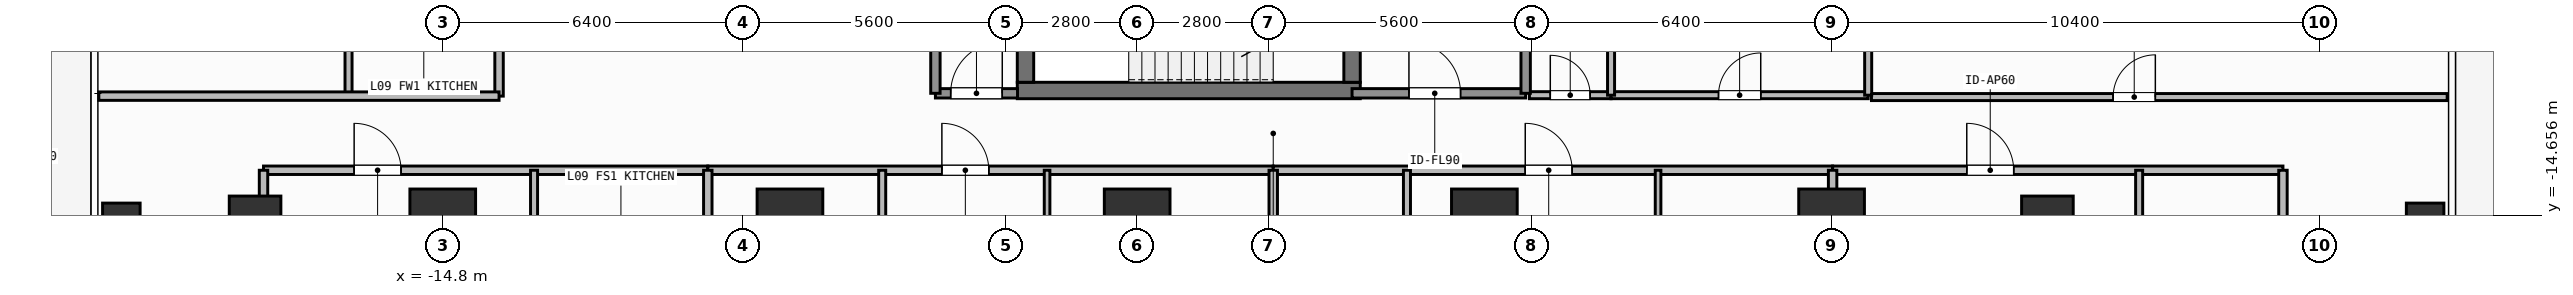
"""IFC4 building model, lengths in metres.
Left out: names, types, materials, properties, quantities, classifications, styles, units other than length and angle.
Written with IfcOpenShell. Run it as: python <this file> out.ifc"""

import sys

from ifc_helpers import new_model, si_unit, direction, frame, frame_2d, origin, origin_2d, place, context, subcontext, project, spatial, rectangle, hollow_rectangle, extrude, element, fill, save


model = new_model("IFC4")
c1 = context("Model", 3, precision=1e-05, world=origin(), true_north=direction((0.0, 1.0)))
c2 = subcontext(c1, "Body", "Model", "MODEL_VIEW")
j1 = project(units=[si_unit("LENGTHUNIT", "METRE"), si_unit("PLANEANGLEUNIT", "RADIAN")], contexts=[c1])
p1 = place(None, origin())
s1 = spatial("IfcSite", under=j1, at=p1, CompositionType="ELEMENT")
p2 = place(p1, origin())
s2 = spatial("IfcBuilding", under=s1, at=p2, CompositionType="ELEMENT")
p3 = place(p2, frame((0.0, 0.0, 34.5)))
s3 = spatial("IfcBuildingStorey", under=s2, at=p3, CompositionType="ELEMENT", Elevation=34.5)
p4 = place(p3, frame((-2.555, -12.0, 0.0), z_axis=(0.0, 0.0, 1.0), x_axis=(1.0, 0.0, 0.0)))
e1 = element("IfcWall", 1, at=p4, inside=s3, PredefinedType="SHEAR", context=c2, shape_type="SweptSolid", body=[
    extrude(rectangle(XDim=7.31, YDim=0.35, at=frame_2d((3.655, 0.0))), origin(), (0.0, 0.0, 1.0), 3.9),
])
p5 = place(p3, frame((-2.38, -11.825, 0.0), z_axis=(0.0, 0.0, 1.0), x_axis=(0.0, 1.0, 0.0)))
e2 = element("IfcWall", 2, at=p5, inside=s3, PredefinedType="SHEAR", context=c2, shape_type="SweptSolid", body=[
    extrude(rectangle(XDim=2.925, YDim=0.35, at=frame_2d((1.462, 0.0))), origin(), (0.0, 0.0, 1.0), 3.9),
])
p6 = place(p3, frame((4.58, -8.9, 0.0), z_axis=(0.0, 0.0, 1.0), x_axis=(0.0, -1.0, 0.0)))
e3 = element("IfcWall", 3, at=p6, inside=s3, PredefinedType="SHEAR", context=c2, shape_type="SweptSolid", body=[
    extrude(rectangle(XDim=2.925, YDim=0.35, at=frame_2d((1.462, 0.0))), origin(), (0.0, 0.0, 1.0), 3.9),
])
p7 = place(p6, frame((0.913, 0.0, 0.0)))
e4 = element("IfcOpeningElement", 4, at=p7, cuts=e3, PredefinedType="OPENING", context=c2, shape_type="SweptSolid", body=[
    extrude(rectangle(XDim=1.1, YDim=2.15, at=frame_2d((0.55, 1.075))), frame((0.0, 0.185, 0.0), z_axis=(0.0, -1.0, 0.0), x_axis=(1.0, 0.0, 0.0)), (0.0, 0.0, 1.0), 0.37),
])
for number, where, z_axis, x_axis in (
    (5, (-14.8, -14.8, 0.0), (0.0, 0.0, 1.0), (1.0, 0.0, 0.0)),
    (6, (-7.4, -14.8, 0.0), (0.0, 0.0, 1.0), (1.0, 0.0, 0.0)),
    (7, (0.0, -14.8, 0.0), (0.0, 0.0, 1.0), (1.0, 0.0, 0.0)),
    (8, (7.4, -14.8, 0.0), (0.0, 0.0, 1.0), (1.0, 0.0, 0.0)),
    (9, (14.8, -14.8, 0.0), (0.0, 0.0, 1.0), (1.0, 0.0, 0.0)),
):
    element("IfcColumn", number, at=place(p3, frame(where, z_axis=z_axis, x_axis=x_axis)), inside=s3, PredefinedType="COLUMN", context=c2, shape_type="SweptSolid", body=[
        extrude(rectangle(XDim=1.4, YDim=1.4, at=origin_2d()), origin(), (0.0, 0.0, 1.0), 3.9),
    ])
for number, where, z_axis, x_axis in (
    (10, (-18.8, -14.8, 0.0), (0.0, 0.0, 1.0), (1.0, 0.0, 0.0)),
    (11, (19.4, -14.8, 0.0), (0.0, 0.0, 1.0), (1.0, 0.0, 0.0)),
):
    element("IfcColumn", number, at=place(p3, frame(where, z_axis=z_axis, x_axis=x_axis)), inside=s3, PredefinedType="COLUMN", context=c2, shape_type="SweptSolid", body=[
        extrude(rectangle(XDim=1.1, YDim=1.1, at=origin_2d()), origin(), (0.0, 0.0, 1.0), 3.9),
    ])
for number, where, z_axis, x_axis in (
    (12, (-21.65, -14.8, 0.0), (0.0, 0.0, 1.0), (1.0, 0.0, 0.0)),
    (13, (27.45, -14.8, 0.0), (0.0, 0.0, 1.0), (1.0, 0.0, 0.0)),
):
    element("IfcColumn", number, at=place(p3, frame(where, z_axis=z_axis, x_axis=x_axis)), inside=s3, PredefinedType="COLUMN", context=c2, shape_type="SweptSolid", body=[
        extrude(hollow_rectangle(XDim=0.8, YDim=0.8, WallThickness=0.036, at=origin_2d()), origin(), (0.0, 0.0, 1.0), 3.9),
    ])
p8 = place(p3, frame((4.58, -12.06, 0.0), z_axis=(0.0, 0.0, 1.0), x_axis=(1.0, 0.0, 0.0)))
e14 = element("IfcWall", 14, at=p8, inside=s3, PredefinedType="SOLIDWALL", context=c2, shape_type="SweptSolid", body=[
    extrude(rectangle(XDim=3.7, YDim=0.2, at=frame_2d((1.85, 0.0))), origin(), (0.0, 0.0, 1.0), 3.68),
])
p9 = place(p8, frame((1.212, 0.0, 0.0)))
e15 = element("IfcOpeningElement", 15, at=p9, cuts=e14, PredefinedType="OPENING", context=c2, shape_type="SweptSolid", body=[
    extrude(rectangle(XDim=1.1, YDim=2.15, at=frame_2d((0.55, 1.075))), frame((0.0, 0.11, 0.0), z_axis=(0.0, -1.0, 0.0), x_axis=(1.0, 0.0, 0.0)), (0.0, 0.0, 1.0), 0.22),
])
p10 = place(p3, frame((-4.3, -12.06, 0.0), z_axis=(0.0, 0.0, 1.0), x_axis=(1.0, 0.0, 0.0)))
e16 = element("IfcWall", 16, at=p10, inside=s3, PredefinedType="SOLIDWALL", context=c2, shape_type="SweptSolid", body=[
    extrude(rectangle(XDim=1.75, YDim=0.2, at=frame_2d((0.875, 0.0))), origin(), (0.0, 0.0, 1.0), 3.68),
])
p11 = place(p10, frame((0.325, 0.0, 0.0)))
e17 = element("IfcOpeningElement", 17, at=p11, cuts=e16, PredefinedType="OPENING", context=c2, shape_type="SweptSolid", body=[
    extrude(rectangle(XDim=1.1, YDim=2.15, at=frame_2d((0.55, 1.075))), frame((0.0, 0.11, 0.0), z_axis=(0.0, -1.0, 0.0), x_axis=(1.0, 0.0, 0.0)), (0.0, 0.0, 1.0), 0.22),
])
p12 = place(p3, frame((8.36, -12.1, 0.0), z_axis=(0.0, 0.0, 1.0), x_axis=(1.0, 0.0, 0.0)))
e18 = element("IfcWall", 18, at=p12, inside=s3, PredefinedType="PARTITIONING", context=c2, shape_type="SweptSolid", body=[
    extrude(rectangle(XDim=1.74, YDim=0.15, at=frame_2d((0.87, 0.0))), origin(), (0.0, 0.0, 1.0), 3.68),
])
p13 = place(p12, frame((0.445, 0.0, 0.0)))
e19 = element("IfcOpeningElement", 19, at=p13, cuts=e18, PredefinedType="OPENING", context=c2, shape_type="SweptSolid", body=[
    extrude(rectangle(XDim=0.85, YDim=2.1, at=frame_2d((0.425, 1.05))), frame((0.0, 0.085, 0.0), z_axis=(0.0, -1.0, 0.0), x_axis=(1.0, 0.0, 0.0)), (0.0, 0.0, 1.0), 0.17),
])
p14 = place(p3, frame((10.1, -12.1, 0.0), z_axis=(0.0, 0.0, 1.0), x_axis=(1.0, 0.0, 0.0)))
e20 = element("IfcWall", 20, at=p14, inside=s3, PredefinedType="PARTITIONING", context=c2, shape_type="SweptSolid", body=[
    extrude(rectangle(XDim=5.48, YDim=0.15, at=frame_2d((2.74, 0.0))), origin(), (0.0, 0.0, 1.0), 3.68),
])
p15 = place(p14, frame((2.29, 0.0, 0.0)))
e21 = element("IfcOpeningElement", 21, at=p15, cuts=e20, PredefinedType="OPENING", context=c2, shape_type="SweptSolid", body=[
    extrude(rectangle(XDim=0.9, YDim=2.1, at=frame_2d((0.45, 1.05))), frame((0.0, 0.085, 0.0), z_axis=(0.0, -1.0, 0.0), x_axis=(1.0, 0.0, 0.0)), (0.0, 0.0, 1.0), 0.17),
])
p16 = place(p3, frame((-18.62, -13.7, 0.0), z_axis=(0.0, 0.0, 1.0), x_axis=(1.0, 0.0, 0.0)))
e22 = element("IfcWall", 22, at=p16, inside=s3, PredefinedType="PARTITIONING", context=c2, shape_type="SweptSolid", body=[
    extrude(rectangle(XDim=9.469, YDim=0.18, at=frame_2d((4.735, 0.0))), origin(), (0.0, 0.0, 1.0), 3.68),
])
p17 = place(p16, frame((1.931, 0.0, 0.0)))
e23 = element("IfcOpeningElement", 23, at=p17, cuts=e22, PredefinedType="OPENING", context=c2, shape_type="SweptSolid", body=[
    extrude(rectangle(XDim=1.0, YDim=2.2, at=frame_2d((0.5, 1.1))), frame((0.0, 0.1, 0.0), z_axis=(0.0, -1.0, 0.0), x_axis=(1.0, 0.0, 0.0)), (0.0, 0.0, 1.0), 0.2),
])
p18 = place(p3, frame((-12.854, -17.599, 0.0), z_axis=(0.0, 0.0, 1.0), x_axis=(0.0, 1.0, 0.0)))
e24 = element("IfcWall", 24, at=p18, inside=s3, PredefinedType="PARTITIONING", context=c2, shape_type="SweptSolid", body=[
    extrude(rectangle(XDim=3.899, YDim=0.15, at=frame_2d((1.95, 0.0))), origin(), (0.0, 0.0, 1.0), 3.68),
])
p19 = place(p18, frame((1.183, 0.0, 0.0)))
e25 = element("IfcOpeningElement", 25, at=p19, cuts=e24, PredefinedType="OPENING", context=c2, shape_type="SweptSolid", body=[
    extrude(rectangle(XDim=0.85, YDim=2.1, at=frame_2d((0.425, 1.05))), frame((0.0, 0.085, 0.0), z_axis=(0.0, -1.0, 0.0), x_axis=(1.0, 0.0, 0.0)), (0.0, 0.0, 1.0), 0.17),
])
p20 = place(p3, frame((-9.151, -13.7, 0.0), z_axis=(0.0, 0.0, 1.0), x_axis=(1.0, 0.0, 0.0)))
e26 = element("IfcWall", 26, at=p20, inside=s3, PredefinedType="PARTITIONING", context=c2, shape_type="SweptSolid", body=[
    extrude(rectangle(XDim=12.051, YDim=0.18, at=frame_2d((6.025, 0.0))), origin(), (0.0, 0.0, 1.0), 3.68),
])
p21 = place(p20, frame((4.989, 0.0, 0.0)))
e27 = element("IfcOpeningElement", 27, at=p21, cuts=e26, PredefinedType="OPENING", context=c2, shape_type="SweptSolid", body=[
    extrude(rectangle(XDim=1.0, YDim=2.2, at=frame_2d((0.5, 1.1))), frame((0.0, 0.1, 0.0), z_axis=(0.0, -1.0, 0.0), x_axis=(1.0, 0.0, 0.0)), (0.0, 0.0, 1.0), 0.2),
])
p22 = place(p3, frame((-5.434, -20.79, 0.0), z_axis=(0.0, 0.0, 1.0), x_axis=(0.0, 1.0, 0.0)))
e28 = element("IfcWall", 28, at=p22, inside=s3, PredefinedType="PARTITIONING", context=c2, shape_type="SweptSolid", body=[
    extrude(rectangle(XDim=7.09, YDim=0.15, at=frame_2d((3.545, 0.0))), origin(), (0.0, 0.0, 1.0), 3.68),
])
p23 = place(p22, frame((2.133, 0.0, 0.0)))
e29 = element("IfcOpeningElement", 29, at=p23, cuts=e28, PredefinedType="OPENING", context=c2, shape_type="SweptSolid", body=[
    extrude(rectangle(XDim=0.85, YDim=2.1, at=frame_2d((0.425, 1.05))), frame((0.0, 0.085, 0.0), z_axis=(0.0, -1.0, 0.0), x_axis=(1.0, 0.0, 0.0)), (0.0, 0.0, 1.0), 0.17),
])
p24 = place(p3, frame((-1.92, -18.663, 0.0), z_axis=(0.0, 0.0, 1.0), x_axis=(0.0, 1.0, 0.0)))
e30 = element("IfcWall", 30, at=p24, inside=s3, PredefinedType="PARTITIONING", context=c2, shape_type="SweptSolid", body=[
    extrude(rectangle(XDim=4.963, YDim=0.12, at=frame_2d((2.481, 0.0))), origin(), (0.0, 0.0, 1.0), 3.68),
])
p25 = place(p24, frame((2.056, 0.0, 0.0)))
e31 = element("IfcOpeningElement", 31, at=p25, cuts=e30, PredefinedType="OPENING", context=c2, shape_type="SweptSolid", body=[
    extrude(rectangle(XDim=0.85, YDim=2.1, at=frame_2d((0.425, 1.05))), frame((0.0, 0.07, 0.0), z_axis=(0.0, -1.0, 0.0), x_axis=(1.0, 0.0, 0.0)), (0.0, 0.0, 1.0), 0.14),
])
p26 = place(p3, frame((2.9, -13.7, 0.0), z_axis=(0.0, 0.0, 1.0), x_axis=(1.0, 0.0, 0.0)))
e32 = element("IfcWall", 32, at=p26, inside=s3, PredefinedType="PARTITIONING", context=c2, shape_type="SweptSolid", body=[
    extrude(rectangle(XDim=11.922, YDim=0.18, at=frame_2d((5.961, 0.0))), origin(), (0.0, 0.0, 1.0), 3.68),
])
p27 = place(p26, frame((5.371, 0.0, 0.0)))
e33 = element("IfcOpeningElement", 33, at=p27, cuts=e32, PredefinedType="OPENING", context=c2, shape_type="SweptSolid", body=[
    extrude(rectangle(XDim=1.0, YDim=2.2, at=frame_2d((0.5, 1.1))), frame((0.0, 0.1, 0.0), z_axis=(0.0, -1.0, 0.0), x_axis=(1.0, 0.0, 0.0)), (0.0, 0.0, 1.0), 0.2),
])
p28 = place(p3, frame((5.75, -20.79, 0.0), z_axis=(0.0, 0.0, 1.0), x_axis=(0.0, 1.0, 0.0)))
e34 = element("IfcWall", 34, at=p28, inside=s3, PredefinedType="PARTITIONING", context=c2, shape_type="SweptSolid", body=[
    extrude(rectangle(XDim=7.09, YDim=0.15, at=frame_2d((3.545, 0.0))), origin(), (0.0, 0.0, 1.0), 3.68),
])
p29 = place(p28, frame((2.133, 0.0, 0.0)))
e35 = element("IfcOpeningElement", 35, at=p29, cuts=e34, PredefinedType="OPENING", context=c2, shape_type="SweptSolid", body=[
    extrude(rectangle(XDim=0.85, YDim=2.1, at=frame_2d((0.425, 1.05))), frame((0.0, 0.085, 0.0), z_axis=(0.0, -1.0, 0.0), x_axis=(1.0, 0.0, 0.0)), (0.0, 0.0, 1.0), 0.17),
])
p30 = place(p3, frame((11.102, -18.535, 0.0), z_axis=(0.0, 0.0, 1.0), x_axis=(0.0, 1.0, 0.0)))
e36 = element("IfcWall", 36, at=p30, inside=s3, PredefinedType="PARTITIONING", context=c2, shape_type="SweptSolid", body=[
    extrude(rectangle(XDim=4.835, YDim=0.12, at=frame_2d((2.417, 0.0))), origin(), (0.0, 0.0, 1.0), 3.37),
])
p31 = place(p30, frame((1.905, 0.0, 0.0)))
e37 = element("IfcOpeningElement", 37, at=p31, cuts=e36, PredefinedType="OPENING", context=c2, shape_type="SweptSolid", body=[
    extrude(rectangle(XDim=0.85, YDim=2.1, at=frame_2d((0.425, 1.05))), frame((0.0, 0.07, 0.0), z_axis=(0.0, -1.0, 0.0), x_axis=(1.0, 0.0, 0.0)), (0.0, 0.0, 1.0), 0.14),
])
p32 = place(p3, frame((14.822, -13.7, 0.0), z_axis=(0.0, 0.0, 1.0), x_axis=(1.0, 0.0, 0.0)))
e38 = element("IfcWall", 38, at=p32, inside=s3, PredefinedType="PARTITIONING", context=c2, shape_type="SweptSolid", body=[
    extrude(rectangle(XDim=9.598, YDim=0.18, at=frame_2d((4.799, 0.0))), origin(), (0.0, 0.0, 1.0), 3.68),
])
p33 = place(p32, frame((2.859, 0.0, 0.0)))
e39 = element("IfcOpeningElement", 39, at=p33, cuts=e38, PredefinedType="OPENING", context=c2, shape_type="SweptSolid", body=[
    extrude(rectangle(XDim=1.0, YDim=2.2, at=frame_2d((0.5, 1.1))), frame((0.0, 0.1, 0.0), z_axis=(0.0, -1.0, 0.0), x_axis=(1.0, 0.0, 0.0)), (0.0, 0.0, 1.0), 0.2),
])
p34 = place(p3, frame((21.355, -17.599, 0.0), z_axis=(0.0, 0.0, 1.0), x_axis=(0.0, 1.0, 0.0)))
e40 = element("IfcWall", 40, at=p34, inside=s3, PredefinedType="PARTITIONING", context=c2, shape_type="SweptSolid", body=[
    extrude(rectangle(XDim=3.899, YDim=0.15, at=frame_2d((1.95, 0.0))), origin(), (0.0, 0.0, 1.0), 3.68),
])
p35 = place(p34, frame((1.354, 0.0, 0.0)))
e41 = element("IfcOpeningElement", 41, at=p35, cuts=e40, PredefinedType="OPENING", context=c2, shape_type="SweptSolid", body=[
    extrude(rectangle(XDim=0.85, YDim=2.1, at=frame_2d((0.425, 1.05))), frame((0.0, 0.085, 0.0), z_axis=(0.0, -1.0, 0.0), x_axis=(1.0, 0.0, 0.0)), (0.0, 0.0, 1.0), 0.17),
])
p36 = place(p3, frame((-13.6, -12.12, 0.0), z_axis=(0.0, 0.0, 1.0), x_axis=(0.0, 1.0, 0.0)))
e42 = element("IfcWall", 42, at=p36, inside=s3, PredefinedType="PARTITIONING", context=c2, shape_type="SweptSolid", body=[
    extrude(rectangle(XDim=12.847, YDim=0.18, at=frame_2d((6.424, 0.0))), origin(), (0.0, 0.0, 1.0), 3.68),
])
p37 = place(p36, frame((5.48, 0.0, 0.0)))
e43 = element("IfcOpeningElement", 43, at=p37, cuts=e42, PredefinedType="OPENING", context=c2, shape_type="SweptSolid", body=[
    extrude(rectangle(XDim=1.0, YDim=2.2, at=frame_2d((0.5, 1.1))), frame((0.0, 0.1, 0.0), z_axis=(0.0, -1.0, 0.0), x_axis=(1.0, 0.0, 0.0)), (0.0, 0.0, 1.0), 0.2),
])
p38 = place(p3, frame((15.65, -12.14, 0.0), z_axis=(0.0, 0.0, 1.0), x_axis=(1.0, 0.0, 0.0)))
e44 = element("IfcWall", 44, at=p38, inside=s3, PredefinedType="PARTITIONING", context=c2, shape_type="SweptSolid", body=[
    extrude(rectangle(XDim=12.27, YDim=0.15, at=frame_2d((6.135, 0.0))), origin(), (0.0, 0.0, 1.0), 3.68),
])
p39 = place(p38, frame((5.15, 0.0, 0.0)))
e45 = element("IfcOpeningElement", 45, at=p39, cuts=e44, PredefinedType="OPENING", context=c2, shape_type="SweptSolid", body=[
    extrude(rectangle(XDim=0.9, YDim=2.1, at=frame_2d((0.45, 1.05))), frame((0.0, 0.085, 0.0), z_axis=(0.0, -1.0, 0.0), x_axis=(1.0, 0.0, 0.0)), (0.0, 0.0, 1.0), 0.17),
])
for number, where, z_axis, x_axis in (
    (46, (8.28, -12.06, 0.0), (0.0, 0.0, 1.0), (0.0, 1.0, 0.0)),
    (47, (-4.3, -12.06, 0.0), (0.0, 0.0, 1.0), (0.0, 1.0, 0.0)),
):
    element("IfcWall", number, at=place(p3, frame(where, z_axis=z_axis, x_axis=x_axis)), inside=s3, PredefinedType="SOLIDWALL", context=c2, shape_type="SweptSolid", body=[
        extrude(rectangle(XDim=3.11, YDim=0.2, at=frame_2d((1.555, 0.0))), origin(), (0.0, 0.0, 1.0), 3.68),
    ])
p40 = place(p3, frame((10.1, -12.1, 0.0), z_axis=(0.0, 0.0, 1.0), x_axis=(0.0, 1.0, 0.0)))
e48 = element("IfcWall", 48, at=p40, inside=s3, PredefinedType="PARTITIONING", context=c2, shape_type="SweptSolid", body=[
    extrude(rectangle(XDim=2.35, YDim=0.15, at=frame_2d((1.175, 0.0))), origin(), (0.0, 0.0, 1.0), 3.68),
])
p41 = place(p3, frame((15.58, -12.1, 0.0), z_axis=(0.0, 0.0, 1.0), x_axis=(0.0, 1.0, 0.0)))
e49 = element("IfcWall", 49, at=p41, inside=s3, PredefinedType="PARTITIONING", context=c2, shape_type="SweptSolid", body=[
    extrude(rectangle(XDim=6.25, YDim=0.15, at=frame_2d((3.125, 0.0))), origin(), (0.0, 0.0, 1.0), 3.68),
])
p42 = place(p3, frame((-18.62, -23.91, 0.0), z_axis=(0.0, 0.0, 1.0), x_axis=(0.0, 1.0, 0.0)))
e50 = element("IfcWall", 50, at=p42, inside=s3, PredefinedType="PARTITIONING", context=c2, shape_type="SweptSolid", body=[
    extrude(rectangle(XDim=10.21, YDim=0.18, at=frame_2d((5.105, 0.0))), origin(), (0.0, 0.0, 1.0), 3.082),
])
p43 = place(p3, frame((24.42, -23.91, 0.0), z_axis=(0.0, 0.0, 1.0), x_axis=(0.0, 1.0, 0.0)))
e51 = element("IfcWall", 51, at=p43, inside=s3, PredefinedType="PARTITIONING", context=c2, shape_type="SweptSolid", body=[
    extrude(rectangle(XDim=10.21, YDim=0.18, at=frame_2d((5.105, 0.0))), origin(), (0.0, 0.0, 1.0), 3.68),
])
for number, where, z_axis, x_axis in (
    (52, (-9.151, -25.03, 0.0), (0.0, 0.0, 1.0), (0.0, 1.0, 0.0)),
    (53, (2.9, -25.03, 0.0), (0.0, 0.0, 1.0), (0.0, 1.0, 0.0)),
):
    element("IfcWall", number, at=place(p3, frame(where, z_axis=z_axis, x_axis=x_axis)), inside=s3, PredefinedType="PARTITIONING", context=c2, shape_type="SweptSolid", body=[
        extrude(rectangle(XDim=11.33, YDim=0.18, at=frame_2d((5.665, 0.0))), origin(), (0.0, 0.0, 1.0), 3.68),
    ])
p44 = place(p3, frame((14.822, -25.03, 0.0), z_axis=(0.0, 0.0, 1.0), x_axis=(0.0, 1.0, 0.0)))
e54 = element("IfcWall", 54, at=p44, inside=s3, PredefinedType="PARTITIONING", context=c2, shape_type="SweptSolid", body=[
    extrude(rectangle(XDim=11.33, YDim=0.18, at=frame_2d((5.665, 0.0))), origin(), (0.0, 0.0, 1.0), 3.082),
])
p45 = place(p3, frame((-16.808, -12.12, 0.0), z_axis=(0.0, 0.0, 1.0), x_axis=(0.0, 1.0, 0.0)))
e55 = element("IfcWall", 55, at=p45, inside=s3, PredefinedType="PARTITIONING", context=c2, shape_type="SweptSolid", body=[
    extrude(rectangle(XDim=2.8, YDim=0.15, at=frame_2d((1.4, 0.0))), origin(), (0.0, 0.0, 1.0), 3.68),
])
p46 = place(p3, frame((-22.13, -12.12, 0.0), z_axis=(0.0, 0.0, 1.0), x_axis=(1.0, 0.0, 0.0)))
e56 = element("IfcWall", 56, at=p46, inside=s3, PredefinedType="PARTITIONING", context=c2, shape_type="SweptSolid", body=[
    extrude(rectangle(XDim=8.53, YDim=0.18, at=frame_2d((4.265, 0.0))), origin(), (0.0, 0.0, 1.0), 3.68),
])
p47 = place(p9, origin())
e57 = element("IfcDoor", 57, at=p47, inside=s3, OperationType="SINGLE_SWING_LEFT", PredefinedType="DOOR", context=c2, shape_type="SweptSolid", body=[
    extrude(rectangle(XDim=1.1, YDim=2.15, at=frame_2d((0.55, 1.075))), frame((0.0, 0.025, 0.0), z_axis=(0.0, -1.0, 0.0), x_axis=(1.0, 0.0, 0.0)), (0.0, 0.0, 1.0), 0.05),
])
fill(e15, e57)
p48 = place(p11, origin())
e58 = element("IfcDoor", 58, at=p48, inside=s3, OperationType="SINGLE_SWING_RIGHT", PredefinedType="DOOR", context=c2, shape_type="SweptSolid", body=[
    extrude(rectangle(XDim=1.1, YDim=2.15, at=frame_2d((0.55, 1.075))), frame((0.0, 0.025, 0.0), z_axis=(0.0, -1.0, 0.0), x_axis=(1.0, 0.0, 0.0)), (0.0, 0.0, 1.0), 0.05),
])
fill(e17, e58)
p49 = place(p13, origin())
e59 = element("IfcDoor", 59, at=p49, inside=s3, OperationType="SINGLE_SWING_LEFT", PredefinedType="DOOR", context=c2, shape_type="SweptSolid", body=[
    extrude(rectangle(XDim=0.85, YDim=2.1, at=frame_2d((0.425, 1.05))), frame((0.0, 0.025, 0.0), z_axis=(0.0, -1.0, 0.0), x_axis=(1.0, 0.0, 0.0)), (0.0, 0.0, 1.0), 0.05),
])
fill(e19, e59)
p50 = place(p15, origin())
e60 = element("IfcDoor", 60, at=p50, inside=s3, OperationType="SINGLE_SWING_RIGHT", PredefinedType="DOOR", context=c2, shape_type="SweptSolid", body=[
    extrude(rectangle(XDim=0.9, YDim=2.1, at=frame_2d((0.45, 1.05))), frame((0.0, 0.025, 0.0), z_axis=(0.0, -1.0, 0.0), x_axis=(1.0, 0.0, 0.0)), (0.0, 0.0, 1.0), 0.05),
])
fill(e21, e60)
p51 = place(p17, origin())
e61 = element("IfcDoor", 61, at=p51, inside=s3, OperationType="SINGLE_SWING_LEFT", PredefinedType="DOOR", context=c2, shape_type="SweptSolid", body=[
    extrude(rectangle(XDim=1.0, YDim=2.2, at=frame_2d((0.5, 1.1))), frame((0.0, 0.025, 0.0), z_axis=(0.0, -1.0, 0.0), x_axis=(1.0, 0.0, 0.0)), (0.0, 0.0, 1.0), 0.05),
])
fill(e23, e61)
p52 = place(p21, origin())
e62 = element("IfcDoor", 62, at=p52, inside=s3, OperationType="SINGLE_SWING_LEFT", PredefinedType="DOOR", context=c2, shape_type="SweptSolid", body=[
    extrude(rectangle(XDim=1.0, YDim=2.2, at=frame_2d((0.5, 1.1))), frame((0.0, 0.025, 0.0), z_axis=(0.0, -1.0, 0.0), x_axis=(1.0, 0.0, 0.0)), (0.0, 0.0, 1.0), 0.05),
])
fill(e27, e62)
p53 = place(p27, origin())
e63 = element("IfcDoor", 63, at=p53, inside=s3, OperationType="SINGLE_SWING_LEFT", PredefinedType="DOOR", context=c2, shape_type="SweptSolid", body=[
    extrude(rectangle(XDim=1.0, YDim=2.2, at=frame_2d((0.5, 1.1))), frame((0.0, 0.025, 0.0), z_axis=(0.0, -1.0, 0.0), x_axis=(1.0, 0.0, 0.0)), (0.0, 0.0, 1.0), 0.05),
])
fill(e33, e63)
p54 = place(p33, origin())
e64 = element("IfcDoor", 64, at=p54, inside=s3, OperationType="SINGLE_SWING_LEFT", PredefinedType="DOOR", context=c2, shape_type="SweptSolid", body=[
    extrude(rectangle(XDim=1.0, YDim=2.2, at=frame_2d((0.5, 1.1))), frame((0.0, 0.025, 0.0), z_axis=(0.0, -1.0, 0.0), x_axis=(1.0, 0.0, 0.0)), (0.0, 0.0, 1.0), 0.05),
])
fill(e39, e64)
p55 = place(p39, origin())
e65 = element("IfcDoor", 65, at=p55, inside=s3, OperationType="SINGLE_SWING_RIGHT", PredefinedType="DOOR", context=c2, shape_type="SweptSolid", body=[
    extrude(rectangle(XDim=0.9, YDim=2.1, at=frame_2d((0.45, 1.05))), frame((0.0, 0.025, 0.0), z_axis=(0.0, -1.0, 0.0), x_axis=(1.0, 0.0, 0.0)), (0.0, 0.0, 1.0), 0.05),
])
fill(e45, e65)
save(model, sys.argv[1])
